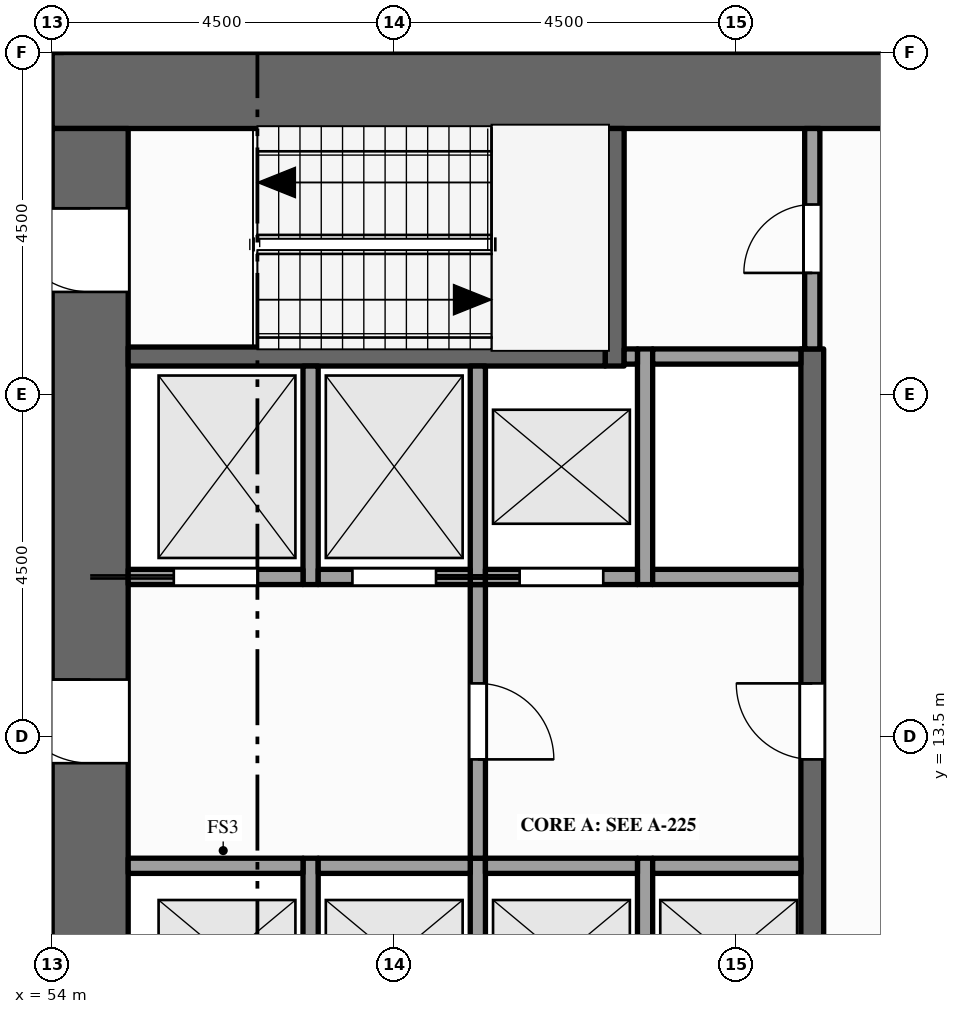
"""IFC4 building model, lengths in metres.
Left out: names, types, materials, properties, quantities, classifications, styles, units other than length and angle.
Written with IfcOpenShell. Run it as: python <this file> out.ifc"""

import sys

from ifc_helpers import new_model, si_unit, direction, frame, frame_2d, origin, place, context, subcontext, project, spatial, rectangle, extrude, element, fill, save


model = new_model("IFC4")
c1 = context("Model", 3, precision=1e-05, world=origin(), true_north=direction((0.0, 1.0)))
c2 = subcontext(c1, "Body", "Model", "MODEL_VIEW")
j1 = project(units=[si_unit("LENGTHUNIT", "METRE"), si_unit("PLANEANGLEUNIT", "RADIAN")], contexts=[c1])
p1 = place(None, origin())
s1 = spatial("IfcSite", under=j1, at=p1, CompositionType="ELEMENT")
p2 = place(p1, origin())
s2 = spatial("IfcBuilding", under=s1, at=p2, CompositionType="ELEMENT")
p3 = place(p2, frame((0.0, 0.0, 139.0)))
s3 = spatial("IfcBuildingStorey", under=s2, at=p3, CompositionType="ELEMENT", Elevation=139.0)
p4 = place(p3, frame((54.0, 22.0, -0.15), z_axis=(0.0, 0.0, 1.0), x_axis=(1.0, 0.0, 0.0)))
e1 = element("IfcWall", 1, at=p4, inside=s3, PredefinedType="SHEAR", context=c2, shape_type="SweptSolid", body=[
    extrude(rectangle(XDim=13.5, YDim=1.0, at=frame_2d((6.75, 0.0))), origin(), (0.0, 0.0, 1.0), 4.0),
])
p5 = place(p3, frame((54.5, 1.0, -0.15), z_axis=(0.0, 0.0, 1.0), x_axis=(0.0, 1.0, 0.0)))
e2 = element("IfcWall", 2, at=p5, inside=s3, PredefinedType="SHEAR", context=c2, shape_type="SweptSolid", body=[
    extrude(rectangle(XDim=20.5, YDim=1.0, at=frame_2d((10.25, 0.0))), origin(), (0.0, 0.0, 1.0), 4.0),
])
p6 = place(p5, frame((6.1, 0.0, 0.15)))
e3 = element("IfcOpeningElement", 3, at=p6, cuts=e2, PredefinedType="OPENING", context=c2, shape_type="SweptSolid", body=[
    extrude(rectangle(XDim=1.8, YDim=2.1, at=frame_2d((0.9, 1.05))), frame((0.0, 0.51, 0.0), z_axis=(0.0, -1.0, 0.0), x_axis=(1.0, 0.0, 0.0)), (0.0, 0.0, 1.0), 1.02),
])
p7 = place(p5, frame((12.15, 0.0, 0.15)))
e4 = element("IfcOpeningElement", 4, at=p7, cuts=e2, PredefinedType="OPENING", context=c2, shape_type="SweptSolid", body=[
    extrude(rectangle(XDim=1.1, YDim=2.1, at=frame_2d((0.55, 1.05))), frame((0.0, 0.51, 0.0), z_axis=(0.0, -1.0, 0.0), x_axis=(1.0, 0.0, 0.0)), (0.0, 0.0, 1.0), 1.02),
])
p8 = place(p5, frame((1.15, 0.0, 0.15)))
e5 = element("IfcOpeningElement", 5, at=p8, cuts=e2, PredefinedType="OPENING", context=c2, shape_type="SweptSolid", body=[
    extrude(rectangle(XDim=1.1, YDim=2.1, at=frame_2d((0.55, 1.05))), frame((0.0, 0.51, 0.0), z_axis=(0.0, -1.0, 0.0), x_axis=(1.0, 0.0, 0.0)), (0.0, 0.0, 1.0), 1.02),
])
p9 = place(p5, frame((18.35, 0.0, 0.15)))
e6 = element("IfcOpeningElement", 6, at=p9, cuts=e2, PredefinedType="OPENING", context=c2, shape_type="SweptSolid", body=[
    extrude(rectangle(XDim=1.1, YDim=2.1, at=frame_2d((0.55, 1.05))), frame((0.0, 0.51, 0.0), z_axis=(0.0, -1.0, 0.0), x_axis=(1.0, 0.0, 0.0)), (0.0, 0.0, 1.0), 1.02),
])
p10 = place(p3, frame((54.0, 22.5, 0.0), z_axis=(0.0, 0.0, 1.0), x_axis=(0.0, 1.0, 0.0)))
e7 = element("IfcWall", 7, at=p10, inside=s3, PredefinedType="STANDARD", context=c2, shape_type="SweptSolid", body=[
    extrude(rectangle(XDim=1.05, YDim=0.3, at=frame_2d((0.525, 0.0))), origin(), (0.0, 0.0, 1.0), 3.149),
])
p11 = place(p3, frame((57.4, 9.3, 0.0), z_axis=(0.0, 0.0, 1.0), x_axis=(0.0, 1.0, 0.0)))
e8 = element("IfcWall", 8, at=p11, inside=s3, PredefinedType="SOLIDWALL", context=c2, shape_type="SweptSolid", body=[
    extrude(rectangle(XDim=2.6, YDim=0.2, at=frame_2d((1.3, 0.0))), origin(), (0.0, 0.0, 1.0), 3.85),
])
p12 = place(p3, frame((57.4, 15.5, 0.0), z_axis=(0.0, 0.0, 1.0), x_axis=(0.0, 1.0, 0.0)))
e9 = element("IfcWall", 9, at=p12, inside=s3, PredefinedType="SOLIDWALL", context=c2, shape_type="SweptSolid", body=[
    extrude(rectangle(XDim=2.875, YDim=0.2, at=frame_2d((1.438, 0.0))), origin(), (0.0, 0.0, 1.0), 3.85),
])
p13 = place(p3, frame((59.6, 9.3, 0.0), z_axis=(0.0, 0.0, 1.0), x_axis=(0.0, 1.0, 0.0)))
e10 = element("IfcWall", 10, at=p13, inside=s3, PredefinedType="SOLIDWALL", context=c2, shape_type="SweptSolid", body=[
    extrude(rectangle(XDim=2.6, YDim=0.2, at=frame_2d((1.3, 0.0))), origin(), (0.0, 0.0, 1.0), 3.85),
])
p14 = place(p3, frame((59.6, 11.9, 0.0), z_axis=(0.0, 0.0, 1.0), x_axis=(0.0, 1.0, 0.0)))
e11 = element("IfcWall", 11, at=p14, inside=s3, PredefinedType="PARTITIONING", context=c2, shape_type="SweptSolid", body=[
    extrude(rectangle(XDim=3.6, YDim=0.2, at=frame_2d((1.8, 0.0))), origin(), (0.0, 0.0, 1.0), 3.85),
])
p15 = place(p14, frame((1.3, 0.0, 0.0)))
e12 = element("IfcOpeningElement", 12, at=p15, cuts=e11, PredefinedType="OPENING", context=c2, shape_type="SweptSolid", body=[
    extrude(rectangle(XDim=1.0, YDim=2.1, at=frame_2d((0.5, 1.05))), frame((0.0, 0.11, 0.0), z_axis=(0.0, -1.0, 0.0), x_axis=(1.0, 0.0, 0.0)), (0.0, 0.0, 1.0), 0.22),
])
p16 = place(p3, frame((59.6, 15.5, 0.0), z_axis=(0.0, 0.0, 1.0), x_axis=(0.0, 1.0, 0.0)))
e13 = element("IfcWall", 13, at=p16, inside=s3, PredefinedType="SOLIDWALL", context=c2, shape_type="SweptSolid", body=[
    extrude(rectangle(XDim=2.875, YDim=0.2, at=frame_2d((1.438, 0.0))), origin(), (0.0, 0.0, 1.0), 3.85),
])
p17 = place(p3, frame((61.4, 18.375, 0.0), z_axis=(0.0, 0.0, 1.0), x_axis=(0.0, 1.0, 0.0)))
e14 = element("IfcWall", 14, at=p17, inside=s3, PredefinedType="SHEAR", context=c2, shape_type="SweptSolid", body=[
    extrude(rectangle(XDim=3.125, YDim=0.25, at=frame_2d((1.562, 0.0))), origin(), (0.0, 0.0, 1.0), 3.85),
])
p18 = place(p3, frame((61.8, 9.3, 0.0), z_axis=(0.0, 0.0, 1.0), x_axis=(0.0, 1.0, 0.0)))
e15 = element("IfcWall", 15, at=p18, inside=s3, PredefinedType="SOLIDWALL", context=c2, shape_type="SweptSolid", body=[
    extrude(rectangle(XDim=2.6, YDim=0.2, at=frame_2d((1.3, 0.0))), origin(), (0.0, 0.0, 1.0), 3.85),
])
p19 = place(p3, frame((61.8, 15.5, 0.0), z_axis=(0.0, 0.0, 1.0), x_axis=(0.0, 1.0, 0.0)))
e16 = element("IfcWall", 16, at=p19, inside=s3, PredefinedType="SOLIDWALL", context=c2, shape_type="SweptSolid", body=[
    extrude(rectangle(XDim=3.1, YDim=0.2, at=frame_2d((1.55, 0.0))), origin(), (0.0, 0.0, 1.0), 3.85),
])
p20 = place(p3, frame((64.0, 4.1, 0.0), z_axis=(0.0, 0.0, 1.0), x_axis=(0.0, 1.0, 0.0)))
e17 = element("IfcWall", 17, at=p20, inside=s3, PredefinedType="SHEAR", context=c2, shape_type="SweptSolid", body=[
    extrude(rectangle(XDim=14.5, YDim=0.3, at=frame_2d((7.25, 0.0))), origin(), (0.0, 0.0, 1.0), 3.85),
])
p21 = place(p20, frame((3.4, 0.0, 0.0)))
e18 = element("IfcOpeningElement", 18, at=p21, cuts=e17, PredefinedType="OPENING", context=c2, shape_type="SweptSolid", body=[
    extrude(rectangle(XDim=1.0, YDim=2.1, at=frame_2d((0.5, 1.05))), frame((0.0, 0.16, 0.0), z_axis=(0.0, -1.0, 0.0), x_axis=(1.0, 0.0, 0.0)), (0.0, 0.0, 1.0), 0.32),
])
p22 = place(p20, frame((9.1, 0.0, 0.0)))
e19 = element("IfcOpeningElement", 19, at=p22, cuts=e17, PredefinedType="OPENING", context=c2, shape_type="SweptSolid", body=[
    extrude(rectangle(XDim=1.0, YDim=2.1, at=frame_2d((0.5, 1.05))), frame((0.0, 0.16, 0.0), z_axis=(0.0, -1.0, 0.0), x_axis=(1.0, 0.0, 0.0)), (0.0, 0.0, 1.0), 0.32),
])
p23 = place(p3, frame((64.0, 18.6, 0.0), z_axis=(0.0, 0.0, 1.0), x_axis=(0.0, 1.0, 0.0)))
e20 = element("IfcWall", 20, at=p23, inside=s3, PredefinedType="PARTITIONING", context=c2, shape_type="SweptSolid", body=[
    extrude(rectangle(XDim=2.9, YDim=0.2, at=frame_2d((1.45, 0.0))), origin(), (0.0, 0.0, 1.0), 3.85),
])
p24 = place(p23, frame((1.0, 0.0, 0.0)))
e21 = element("IfcOpeningElement", 21, at=p24, cuts=e20, PredefinedType="OPENING", context=c2, shape_type="SweptSolid", body=[
    extrude(rectangle(XDim=0.9, YDim=2.1, at=frame_2d((0.45, 1.05))), frame((0.0, 0.11, 0.0), z_axis=(0.0, -1.0, 0.0), x_axis=(1.0, 0.0, 0.0)), (0.0, 0.0, 1.0), 0.22),
])
p25 = place(p3, frame((55.0, 11.8, 0.0), z_axis=(0.0, 0.0, 1.0), x_axis=(1.0, 0.0, 0.0)))
e22 = element("IfcWall", 22, at=p25, inside=s3, PredefinedType="SOLIDWALL", context=c2, shape_type="SweptSolid", body=[
    extrude(rectangle(XDim=2.3, YDim=0.2, at=frame_2d((1.15, 0.0))), origin(), (0.0, 0.0, 1.0), 3.85),
])
for number, where, z_axis, x_axis in (
    (23, (57.5, 11.8, 0.0), (0.0, 0.0, 1.0), (1.0, 0.0, 0.0)),
    (24, (59.7, 11.8, 0.0), (0.0, 0.0, 1.0), (1.0, 0.0, 0.0)),
):
    element("IfcWall", number, at=place(p3, frame(where, z_axis=z_axis, x_axis=x_axis)), inside=s3, PredefinedType="SOLIDWALL", context=c2, shape_type="SweptSolid", body=[
        extrude(rectangle(XDim=2.0, YDim=0.2, at=frame_2d((1.0, 0.0))), origin(), (0.0, 0.0, 1.0), 3.85),
    ])
p26 = place(p3, frame((61.9, 11.8, 0.0), z_axis=(0.0, 0.0, 1.0), x_axis=(1.0, 0.0, 0.0)))
e25 = element("IfcWall", 25, at=p26, inside=s3, PredefinedType="SOLIDWALL", context=c2, shape_type="SweptSolid", body=[
    extrude(rectangle(XDim=1.95, YDim=0.2, at=frame_2d((0.975, 0.0))), origin(), (0.0, 0.0, 1.0), 3.85),
])
p27 = place(p3, frame((55.0, 15.6, 0.0), z_axis=(0.0, 0.0, 1.0), x_axis=(1.0, 0.0, 0.0)))
e26 = element("IfcWall", 26, at=p27, inside=s3, PredefinedType="SOLIDWALL", context=c2, shape_type="SweptSolid", body=[
    extrude(rectangle(XDim=2.3, YDim=0.2, at=frame_2d((1.15, 0.0))), origin(), (0.0, 0.0, 1.0), 3.85),
])
p28 = place(p27, frame((0.6, 0.0, 0.012)))
e27 = element("IfcOpeningElement", 27, at=p28, cuts=e26, PredefinedType="OPENING", context=c2, shape_type="SweptSolid", body=[
    extrude(rectangle(XDim=1.1, YDim=2.1, at=frame_2d((0.55, 1.05))), frame((0.0, 0.11, 0.0), z_axis=(0.0, -1.0, 0.0), x_axis=(1.0, 0.0, 0.0)), (0.0, 0.0, 1.0), 0.22),
])
p29 = place(p3, frame((57.5, 15.6, 0.0), z_axis=(0.0, 0.0, 1.0), x_axis=(1.0, 0.0, 0.0)))
e28 = element("IfcWall", 28, at=p29, inside=s3, PredefinedType="SOLIDWALL", context=c2, shape_type="SweptSolid", body=[
    extrude(rectangle(XDim=2.0, YDim=0.2, at=frame_2d((1.0, 0.0))), origin(), (0.0, 0.0, 1.0), 3.85),
])
p30 = place(p29, frame((0.45, 0.0, 0.012)))
e29 = element("IfcOpeningElement", 29, at=p30, cuts=e28, PredefinedType="OPENING", context=c2, shape_type="SweptSolid", body=[
    extrude(rectangle(XDim=1.1, YDim=2.1, at=frame_2d((0.55, 1.05))), frame((0.0, 0.11, 0.0), z_axis=(0.0, -1.0, 0.0), x_axis=(1.0, 0.0, 0.0)), (0.0, 0.0, 1.0), 0.22),
])
p31 = place(p3, frame((59.7, 15.6, 0.0), z_axis=(0.0, 0.0, 1.0), x_axis=(1.0, 0.0, 0.0)))
e30 = element("IfcWall", 30, at=p31, inside=s3, PredefinedType="SOLIDWALL", context=c2, shape_type="SweptSolid", body=[
    extrude(rectangle(XDim=2.0, YDim=0.2, at=frame_2d((1.0, 0.0))), origin(), (0.0, 0.0, 1.0), 3.85),
])
p32 = place(p31, frame((0.45, 0.0, 0.012)))
e31 = element("IfcOpeningElement", 31, at=p32, cuts=e30, PredefinedType="OPENING", context=c2, shape_type="SweptSolid", body=[
    extrude(rectangle(XDim=1.1, YDim=2.1, at=frame_2d((0.55, 1.05))), frame((0.0, 0.11, 0.0), z_axis=(0.0, -1.0, 0.0), x_axis=(1.0, 0.0, 0.0)), (0.0, 0.0, 1.0), 0.22),
])
p33 = place(p3, frame((61.9, 15.6, 0.0), z_axis=(0.0, 0.0, 1.0), x_axis=(1.0, 0.0, 0.0)))
e32 = element("IfcWall", 32, at=p33, inside=s3, PredefinedType="SOLIDWALL", context=c2, shape_type="SweptSolid", body=[
    extrude(rectangle(XDim=1.95, YDim=0.2, at=frame_2d((0.975, 0.0))), origin(), (0.0, 0.0, 1.0), 3.85),
])
p34 = place(p3, frame((55.0, 18.5, 0.0), z_axis=(0.0, 0.0, 1.0), x_axis=(1.0, 0.0, 0.0)))
e33 = element("IfcWall", 33, at=p34, inside=s3, PredefinedType="SHEAR", context=c2, shape_type="SweptSolid", body=[
    extrude(rectangle(XDim=6.275, YDim=0.25, at=frame_2d((3.137, 0.0))), origin(), (0.0, 0.0, 1.0), 3.85),
])
p35 = place(p3, frame((61.525, 18.5, 0.0), z_axis=(0.0, 0.0, 1.0), x_axis=(1.0, 0.0, 0.0)))
e34 = element("IfcWall", 34, at=p35, inside=s3, PredefinedType="SOLIDWALL", context=c2, shape_type="SweptSolid", body=[
    extrude(rectangle(XDim=0.175, YDim=0.2, at=frame_2d((0.087, 0.0))), origin(), (0.0, 0.0, 1.0), 3.85),
])
p36 = place(p3, frame((61.9, 18.5, 0.0), z_axis=(0.0, 0.0, 1.0), x_axis=(1.0, 0.0, 0.0)))
e35 = element("IfcWall", 35, at=p36, inside=s3, PredefinedType="SOLIDWALL", context=c2, shape_type="SweptSolid", body=[
    extrude(rectangle(XDim=1.95, YDim=0.2, at=frame_2d((0.975, 0.0))), origin(), (0.0, 0.0, 1.0), 3.85),
])
p37 = place(p28, origin())
e36 = element("IfcDoor", 36, at=p37, inside=s3, OperationType="SLIDING_TO_LEFT", PredefinedType="DOOR", context=c2, shape_type="SweptSolid", body=[
    extrude(rectangle(XDim=1.1, YDim=2.1, at=frame_2d((0.55, 1.05))), frame((0.0, 0.025, 0.0), z_axis=(0.0, -1.0, 0.0), x_axis=(1.0, 0.0, 0.0)), (0.0, 0.0, 1.0), 0.05),
])
fill(e27, e36)
p38 = place(p30, origin())
e37 = element("IfcDoor", 37, at=p38, inside=s3, OperationType="SLIDING_TO_RIGHT", PredefinedType="DOOR", context=c2, shape_type="SweptSolid", body=[
    extrude(rectangle(XDim=1.1, YDim=2.1, at=frame_2d((0.55, 1.05))), frame((0.0, 0.025, 0.0), z_axis=(0.0, -1.0, 0.0), x_axis=(1.0, 0.0, 0.0)), (0.0, 0.0, 1.0), 0.05),
])
fill(e29, e37)
p39 = place(p32, origin())
e38 = element("IfcDoor", 38, at=p39, inside=s3, OperationType="SLIDING_TO_LEFT", PredefinedType="DOOR", context=c2, shape_type="SweptSolid", body=[
    extrude(rectangle(XDim=1.1, YDim=2.1, at=frame_2d((0.55, 1.05))), frame((0.0, 0.025, 0.0), z_axis=(0.0, -1.0, 0.0), x_axis=(1.0, 0.0, 0.0)), (0.0, 0.0, 1.0), 0.05),
])
fill(e31, e38)
p40 = place(p7, origin())
e39 = element("IfcDoor", 39, at=p40, inside=s3, OperationType="SINGLE_SWING_RIGHT", PredefinedType="DOOR", context=c2, shape_type="SweptSolid", body=[
    extrude(rectangle(XDim=1.1, YDim=2.1, at=frame_2d((0.55, 1.05))), frame((0.0, 0.025, 0.0), z_axis=(0.0, -1.0, 0.0), x_axis=(1.0, 0.0, 0.0)), (0.0, 0.0, 1.0), 0.05),
])
fill(e4, e39)
p41 = place(p15, origin())
e40 = element("IfcDoor", 40, at=p41, inside=s3, OperationType="SINGLE_SWING_LEFT", PredefinedType="DOOR", context=c2, shape_type="SweptSolid", body=[
    extrude(rectangle(XDim=1.0, YDim=2.1, at=frame_2d((0.5, 1.05))), frame((0.0, 0.025, 0.0), z_axis=(0.0, -1.0, 0.0), x_axis=(1.0, 0.0, 0.0)), (0.0, 0.0, 1.0), 0.05),
])
fill(e12, e40)
p42 = place(p22, origin())
e41 = element("IfcDoor", 41, at=p42, inside=s3, OperationType="SINGLE_SWING_RIGHT", PredefinedType="DOOR", context=c2, shape_type="SweptSolid", body=[
    extrude(rectangle(XDim=1.0, YDim=2.1, at=frame_2d((0.5, 1.05))), frame((0.0, 0.025, 0.0), z_axis=(0.0, -1.0, 0.0), x_axis=(1.0, 0.0, 0.0)), (0.0, 0.0, 1.0), 0.05),
])
fill(e19, e41)
p43 = place(p9, origin())
e42 = element("IfcDoor", 42, at=p43, inside=s3, OperationType="SINGLE_SWING_RIGHT", PredefinedType="DOOR", context=c2, shape_type="SweptSolid", body=[
    extrude(rectangle(XDim=1.1, YDim=2.1, at=frame_2d((0.55, 1.05))), frame((0.0, 0.025, 0.0), z_axis=(0.0, -1.0, 0.0), x_axis=(1.0, 0.0, 0.0)), (0.0, 0.0, 1.0), 0.05),
])
fill(e6, e42)
p44 = place(p24, origin())
e43 = element("IfcDoor", 43, at=p44, inside=s3, OperationType="SINGLE_SWING_LEFT", PredefinedType="DOOR", context=c2, shape_type="SweptSolid", body=[
    extrude(rectangle(XDim=0.9, YDim=2.1, at=frame_2d((0.45, 1.05))), frame((0.0, 0.025, 0.0), z_axis=(0.0, -1.0, 0.0), x_axis=(1.0, 0.0, 0.0)), (0.0, 0.0, 1.0), 0.05),
])
fill(e21, e43)
save(model, sys.argv[1])
